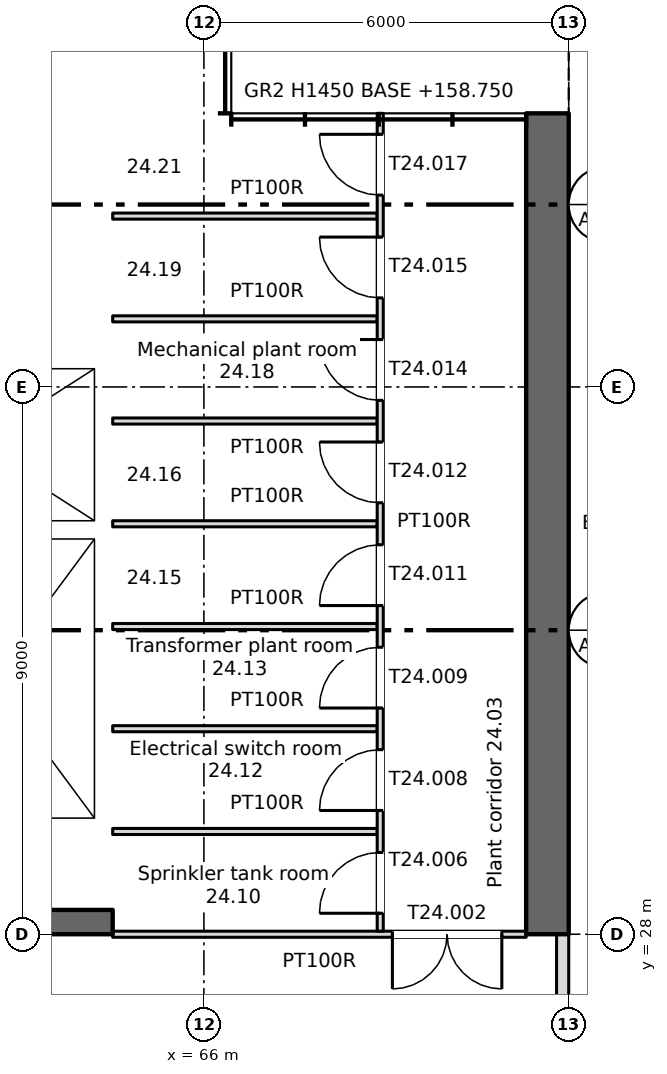
"""IFC4 building model, lengths in metres.
Left out: names, types, materials, properties, quantities, classifications, styles, units other than length and angle.
Written with IfcOpenShell. Run it as: python <this file> out.ifc"""

import sys

from ifc_helpers import new_model, si_unit, direction, frame, frame_2d, origin, place, context, subcontext, project, spatial, rectangle, extrude, element, fill, save


model = new_model("IFC4")
c1 = context("Model", 3, precision=1e-05, world=origin(), true_north=direction((0.0, 1.0)))
c2 = subcontext(c1, "Body", "Model", "MODEL_VIEW")
j1 = project(units=[si_unit("LENGTHUNIT", "METRE"), si_unit("PLANEANGLEUNIT", "RADIAN")], contexts=[c1])
p1 = place(None, origin())
s1 = spatial("IfcSite", under=j1, at=p1, CompositionType="ELEMENT")
p2 = place(p1, origin())
s2 = spatial("IfcBuilding", under=s1, at=p2, CompositionType="ELEMENT")
p3 = place(p2, frame((0.0, 0.0, 158.75)))
s3 = spatial("IfcBuildingStorey", under=s2, at=p3, CompositionType="ELEMENT", Elevation=158.75)
p4 = place(p3, frame((71.65, 28.0, 0.0), z_axis=(0.0, 0.0, 1.0), x_axis=(0.0, 1.0, 0.0)))
e1 = element("IfcWall", 1, at=p4, inside=s3, PredefinedType="SHEAR", context=c2, shape_type="SweptSolid", body=[
    extrude(rectangle(XDim=13.5, YDim=0.7, at=frame_2d((6.75, 0.0))), origin(), (0.0, 0.0, 1.0), 7.2),
])
p5 = place(p3, frame((59.5, 28.2, 0.0), z_axis=(0.0, 0.0, 1.0), x_axis=(1.0, 0.0, 0.0)))
e2 = element("IfcWall", 2, at=p5, inside=s3, PredefinedType="SHEAR", context=c2, shape_type="SweptSolid", body=[
    extrude(rectangle(XDim=5.0, YDim=0.4, at=frame_2d((2.5, 0.0))), origin(), (0.0, 0.0, 1.0), 7.2),
])
p6 = place(p5, frame((2.4, 0.0, 0.0)))
e3 = element("IfcOpeningElement", 3, at=p6, cuts=e2, PredefinedType="OPENING", context=c2, shape_type="SweptSolid", body=[
    extrude(rectangle(XDim=1.2, YDim=2.1, at=frame_2d((0.6, 1.05))), frame((0.0, 0.21, 0.0), z_axis=(0.0, -1.0, 0.0), x_axis=(1.0, 0.0, 0.0)), (0.0, 0.0, 1.0), 0.42),
])
p7 = place(p3, frame((64.35, 34.8, 0.0), z_axis=(0.0, 0.0, 1.0), x_axis=(0.0, 1.0, 0.0)))
e4 = element("IfcWall", 4, at=p7, inside=s3, PredefinedType="SHEAR", context=c2, shape_type="SweptSolid", body=[
    extrude(rectangle(XDim=10.4, YDim=0.3, at=frame_2d((5.2, 0.0))), origin(), (0.0, 0.0, 1.0), 7.2),
])
p8 = place(p3, frame((64.35, 28.4, 0.0), z_axis=(0.0, 0.0, 1.0), x_axis=(0.0, 1.0, 0.0)))
e5 = element("IfcWall", 5, at=p8, inside=s3, PredefinedType="SHEAR", context=c2, shape_type="SweptSolid", body=[
    extrude(rectangle(XDim=6.1, YDim=0.3, at=frame_2d((3.05, 0.0))), origin(), (0.0, 0.0, 1.0), 7.2),
])
p9 = place(p3, frame((60.3, 34.65, 0.0), z_axis=(0.0, 0.0, 1.0), x_axis=(1.0, 0.0, 0.0)))
e6 = element("IfcWall", 6, at=p9, inside=s3, PredefinedType="SHEAR", context=c2, shape_type="SweptSolid", body=[
    extrude(rectangle(XDim=4.2, YDim=0.3, at=frame_2d((2.1, 0.0))), origin(), (0.0, 0.0, 1.0), 7.2),
])
p10 = place(p3, frame((60.3, 37.45, 0.0), z_axis=(0.0, 0.0, 1.0), x_axis=(1.0, 0.0, 0.0)))
e7 = element("IfcWall", 7, at=p10, inside=s3, PredefinedType="SHEAR", context=c2, shape_type="SweptSolid", body=[
    extrude(rectangle(XDim=3.9, YDim=0.3, at=frame_2d((1.95, 0.0))), origin(), (0.0, 0.0, 1.0), 7.2),
])
p11 = place(p10, frame((1.4, 0.0, 0.0)))
e8 = element("IfcOpeningElement", 8, at=p11, cuts=e7, PredefinedType="OPENING", context=c2, shape_type="SweptSolid", body=[
    extrude(rectangle(XDim=1.1, YDim=2.1, at=frame_2d((0.55, 1.05))), frame((0.0, 0.16, 0.0), z_axis=(0.0, -1.0, 0.0), x_axis=(1.0, 0.0, 0.0)), (0.0, 0.0, 1.0), 0.32),
])
p12 = place(p3, frame((64.5, 28.0, 0.0), z_axis=(0.0, 0.0, 1.0), x_axis=(1.0, 0.0, 0.0)))
e9 = element("IfcWall", 9, at=p12, inside=s3, PredefinedType="PARTITIONING", context=c2, shape_type="SweptSolid", body=[
    extrude(rectangle(XDim=6.8, YDim=0.1, at=frame_2d((3.4, 0.0))), origin(), (0.0, 0.0, 1.0), 7.2),
])
p13 = place(p12, frame((4.6, 0.0, 0.0)))
e10 = element("IfcOpeningElement", 10, at=p13, cuts=e9, PredefinedType="OPENING", context=c2, shape_type="SweptSolid", body=[
    extrude(rectangle(XDim=1.8, YDim=2.1, at=frame_2d((0.9, 1.05))), frame((0.0, 0.06, 0.0), z_axis=(0.0, -1.0, 0.0), x_axis=(1.0, 0.0, 0.0)), (0.0, 0.0, 1.0), 0.12),
])
for number, where, z_axis, x_axis in (
    (11, (64.5, 29.69, 0.0), (0.0, 0.0, 1.0), (1.0, 0.0, 0.0)),
    (12, (64.5, 31.38, 0.0), (0.0, 0.0, 1.0), (1.0, 0.0, 0.0)),
    (13, (64.5, 33.06, 0.0), (0.0, 0.0, 1.0), (1.0, 0.0, 0.0)),
    (14, (64.5, 34.75, 0.0), (0.0, 0.0, 1.0), (1.0, 0.0, 0.0)),
    (15, (64.5, 36.44, 0.0), (0.0, 0.0, 1.0), (1.0, 0.0, 0.0)),
    (16, (64.5, 38.12, 0.0), (0.0, 0.0, 1.0), (1.0, 0.0, 0.0)),
    (17, (64.5, 39.81, 0.0), (0.0, 0.0, 1.0), (1.0, 0.0, 0.0)),
):
    element("IfcWall", number, at=place(p3, frame(where, z_axis=z_axis, x_axis=x_axis)), inside=s3, PredefinedType="PARTITIONING", context=c2, shape_type="SweptSolid", body=[
        extrude(rectangle(XDim=4.35, YDim=0.1, at=frame_2d((2.175, 0.0))), origin(), (0.0, 0.0, 1.0), 7.2),
    ])
p14 = place(p3, frame((68.9, 28.05, 0.0), z_axis=(0.0, 0.0, 1.0), x_axis=(0.0, 1.0, 0.0)))
e18 = element("IfcWall", 18, at=p14, inside=s3, PredefinedType="PARTITIONING", context=c2, shape_type="SweptSolid", body=[
    extrude(rectangle(XDim=13.45, YDim=0.1, at=frame_2d((6.725, 0.0))), origin(), (0.0, 0.0, 1.0), 7.2),
])
p15 = place(p14, frame((0.295, 0.0, 0.0)))
e19 = element("IfcOpeningElement", 19, at=p15, cuts=e18, PredefinedType="OPENING", context=c2, shape_type="SweptSolid", body=[
    extrude(rectangle(XDim=1.0, YDim=2.1, at=frame_2d((0.5, 1.05))), frame((0.0, 0.06, 0.0), z_axis=(0.0, -1.0, 0.0), x_axis=(1.0, 0.0, 0.0)), (0.0, 0.0, 1.0), 0.12),
])
p16 = place(p14, frame((1.985, 0.0, 0.0)))
e20 = element("IfcOpeningElement", 20, at=p16, cuts=e18, PredefinedType="OPENING", context=c2, shape_type="SweptSolid", body=[
    extrude(rectangle(XDim=1.0, YDim=2.1, at=frame_2d((0.5, 1.05))), frame((0.0, 0.06, 0.0), z_axis=(0.0, -1.0, 0.0), x_axis=(1.0, 0.0, 0.0)), (0.0, 0.0, 1.0), 0.12),
])
p17 = place(p14, frame((3.67, 0.0, 0.0)))
e21 = element("IfcOpeningElement", 21, at=p17, cuts=e18, PredefinedType="OPENING", context=c2, shape_type="SweptSolid", body=[
    extrude(rectangle(XDim=1.0, YDim=2.1, at=frame_2d((0.5, 1.05))), frame((0.0, 0.06, 0.0), z_axis=(0.0, -1.0, 0.0), x_axis=(1.0, 0.0, 0.0)), (0.0, 0.0, 1.0), 0.12),
])
p18 = place(p14, frame((5.355, 0.0, 0.0)))
e22 = element("IfcOpeningElement", 22, at=p18, cuts=e18, PredefinedType="OPENING", context=c2, shape_type="SweptSolid", body=[
    extrude(rectangle(XDim=1.0, YDim=2.1, at=frame_2d((0.5, 1.05))), frame((0.0, 0.06, 0.0), z_axis=(0.0, -1.0, 0.0), x_axis=(1.0, 0.0, 0.0)), (0.0, 0.0, 1.0), 0.12),
])
p19 = place(p14, frame((7.045, 0.0, 0.0)))
e23 = element("IfcOpeningElement", 23, at=p19, cuts=e18, PredefinedType="OPENING", context=c2, shape_type="SweptSolid", body=[
    extrude(rectangle(XDim=1.0, YDim=2.1, at=frame_2d((0.5, 1.05))), frame((0.0, 0.06, 0.0), z_axis=(0.0, -1.0, 0.0), x_axis=(1.0, 0.0, 0.0)), (0.0, 0.0, 1.0), 0.12),
])
p20 = place(p14, frame((8.73, 0.0, 0.0)))
e24 = element("IfcOpeningElement", 24, at=p20, cuts=e18, PredefinedType="OPENING", context=c2, shape_type="SweptSolid", body=[
    extrude(rectangle(XDim=1.0, YDim=2.1, at=frame_2d((0.5, 1.05))), frame((0.0, 0.06, 0.0), z_axis=(0.0, -1.0, 0.0), x_axis=(1.0, 0.0, 0.0)), (0.0, 0.0, 1.0), 0.12),
])
p21 = place(p14, frame((10.415, 0.0, 0.0)))
e25 = element("IfcOpeningElement", 25, at=p21, cuts=e18, PredefinedType="OPENING", context=c2, shape_type="SweptSolid", body=[
    extrude(rectangle(XDim=1.0, YDim=2.1, at=frame_2d((0.5, 1.05))), frame((0.0, 0.06, 0.0), z_axis=(0.0, -1.0, 0.0), x_axis=(1.0, 0.0, 0.0)), (0.0, 0.0, 1.0), 0.12),
])
p22 = place(p14, frame((12.105, 0.0, 0.0)))
e26 = element("IfcOpeningElement", 26, at=p22, cuts=e18, PredefinedType="OPENING", context=c2, shape_type="SweptSolid", body=[
    extrude(rectangle(XDim=1.0, YDim=2.1, at=frame_2d((0.5, 1.05))), frame((0.0, 0.06, 0.0), z_axis=(0.0, -1.0, 0.0), x_axis=(1.0, 0.0, 0.0)), (0.0, 0.0, 1.0), 0.12),
])
p23 = place(p3, frame((71.9, 25.6, 0.0), z_axis=(0.0, 0.0, 1.0), x_axis=(0.0, 1.0, 0.0)))
e27 = element("IfcWall", 27, at=p23, inside=s3, PredefinedType="PARTITIONING", context=c2, shape_type="SweptSolid", body=[
    extrude(rectangle(XDim=2.4, YDim=0.2, at=frame_2d((1.2, 0.0))), origin(), (0.0, 0.0, 1.0), 1.1),
])
p24 = place(p13, origin())
e28 = element("IfcDoor", 28, at=p24, inside=s3, OperationType="DOUBLE_DOOR_SINGLE_SWING", PredefinedType="DOOR", context=c2, shape_type="SweptSolid", body=[
    extrude(rectangle(XDim=1.8, YDim=2.1, at=frame_2d((0.9, 1.05))), frame((0.0, 0.025, 0.0), z_axis=(0.0, -1.0, 0.0), x_axis=(1.0, 0.0, 0.0)), (0.0, 0.0, 1.0), 0.05),
])
fill(e10, e28)
p25 = place(p15, origin())
e29 = element("IfcDoor", 29, at=p25, inside=s3, OperationType="SINGLE_SWING_LEFT", PredefinedType="DOOR", context=c2, shape_type="SweptSolid", body=[
    extrude(rectangle(XDim=1.0, YDim=2.1, at=frame_2d((0.5, 1.05))), frame((0.0, 0.025, 0.0), z_axis=(0.0, -1.0, 0.0), x_axis=(1.0, 0.0, 0.0)), (0.0, 0.0, 1.0), 0.05),
])
fill(e19, e29)
p26 = place(p16, origin())
e30 = element("IfcDoor", 30, at=p26, inside=s3, OperationType="SINGLE_SWING_LEFT", PredefinedType="DOOR", context=c2, shape_type="SweptSolid", body=[
    extrude(rectangle(XDim=1.0, YDim=2.1, at=frame_2d((0.5, 1.05))), frame((0.0, 0.025, 0.0), z_axis=(0.0, -1.0, 0.0), x_axis=(1.0, 0.0, 0.0)), (0.0, 0.0, 1.0), 0.05),
])
fill(e20, e30)
p27 = place(p17, origin())
e31 = element("IfcDoor", 31, at=p27, inside=s3, OperationType="SINGLE_SWING_LEFT", PredefinedType="DOOR", context=c2, shape_type="SweptSolid", body=[
    extrude(rectangle(XDim=1.0, YDim=2.1, at=frame_2d((0.5, 1.05))), frame((0.0, 0.025, 0.0), z_axis=(0.0, -1.0, 0.0), x_axis=(1.0, 0.0, 0.0)), (0.0, 0.0, 1.0), 0.05),
])
fill(e21, e31)
p28 = place(p18, origin())
e32 = element("IfcDoor", 32, at=p28, inside=s3, OperationType="SINGLE_SWING_LEFT", PredefinedType="DOOR", context=c2, shape_type="SweptSolid", body=[
    extrude(rectangle(XDim=1.0, YDim=2.1, at=frame_2d((0.5, 1.05))), frame((0.0, 0.025, 0.0), z_axis=(0.0, -1.0, 0.0), x_axis=(1.0, 0.0, 0.0)), (0.0, 0.0, 1.0), 0.05),
])
fill(e22, e32)
p29 = place(p19, origin())
e33 = element("IfcDoor", 33, at=p29, inside=s3, OperationType="SINGLE_SWING_RIGHT", PredefinedType="DOOR", context=c2, shape_type="SweptSolid", body=[
    extrude(rectangle(XDim=1.0, YDim=2.1, at=frame_2d((0.5, 1.05))), frame((0.0, 0.025, 0.0), z_axis=(0.0, -1.0, 0.0), x_axis=(1.0, 0.0, 0.0)), (0.0, 0.0, 1.0), 0.05),
])
fill(e23, e33)
p30 = place(p20, origin())
e34 = element("IfcDoor", 34, at=p30, inside=s3, OperationType="SINGLE_SWING_RIGHT", PredefinedType="DOOR", context=c2, shape_type="SweptSolid", body=[
    extrude(rectangle(XDim=1.0, YDim=2.1, at=frame_2d((0.5, 1.05))), frame((0.0, 0.025, 0.0), z_axis=(0.0, -1.0, 0.0), x_axis=(1.0, 0.0, 0.0)), (0.0, 0.0, 1.0), 0.05),
])
fill(e24, e34)
p31 = place(p21, origin())
e35 = element("IfcDoor", 35, at=p31, inside=s3, OperationType="SINGLE_SWING_RIGHT", PredefinedType="DOOR", context=c2, shape_type="SweptSolid", body=[
    extrude(rectangle(XDim=1.0, YDim=2.1, at=frame_2d((0.5, 1.05))), frame((0.0, 0.025, 0.0), z_axis=(0.0, -1.0, 0.0), x_axis=(1.0, 0.0, 0.0)), (0.0, 0.0, 1.0), 0.05),
])
fill(e25, e35)
p32 = place(p22, origin())
e36 = element("IfcDoor", 36, at=p32, inside=s3, OperationType="SINGLE_SWING_RIGHT", PredefinedType="DOOR", context=c2, shape_type="SweptSolid", body=[
    extrude(rectangle(XDim=1.0, YDim=2.1, at=frame_2d((0.5, 1.05))), frame((0.0, 0.025, 0.0), z_axis=(0.0, -1.0, 0.0), x_axis=(1.0, 0.0, 0.0)), (0.0, 0.0, 1.0), 0.05),
])
fill(e26, e36)
save(model, sys.argv[1])
